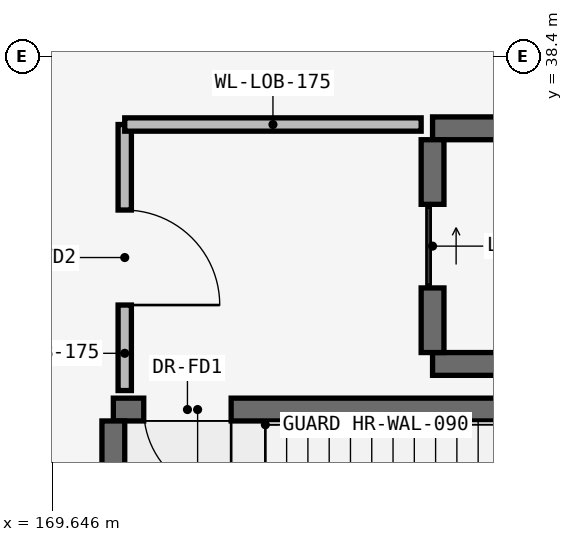
"""IFC4 building model, lengths in metres.
Left out: names, types, materials, properties, quantities, classifications, styles, units other than length and angle.
Written with IfcOpenShell. Run it as: python <this file> out.ifc"""

import sys

from ifc_helpers import new_model, si_unit, direction, frame, frame_2d, origin, place, context, subcontext, project, spatial, rectangle, extrude, element, fill, save


model = new_model("IFC4")
c1 = context("Model", 3, precision=1e-05, world=origin(), true_north=direction((0.0, 1.0)))
c2 = subcontext(c1, "Body", "Model", "MODEL_VIEW")
j1 = project(units=[si_unit("LENGTHUNIT", "METRE"), si_unit("PLANEANGLEUNIT", "RADIAN")], contexts=[c1])
p1 = place(None, origin())
s1 = spatial("IfcSite", under=j1, at=p1, CompositionType="ELEMENT")
p2 = place(p1, origin())
s2 = spatial("IfcBuilding", under=s1, at=p2, CompositionType="ELEMENT")
p3 = place(p2, frame((0.0, 0.0, -4.5)))
s3 = spatial("IfcBuildingStorey", under=s2, at=p3, CompositionType="ELEMENT", Elevation=-4.5)
p4 = place(p3, frame((170.45, 33.75, 0.0), z_axis=(0.0, 0.0, 1.0), x_axis=(1.0, 0.0, 0.0)))
e1 = element("IfcWall", 1, at=p4, inside=s3, PredefinedType="SHEAR", context=c2, shape_type="SweptSolid", body=[
    extrude(rectangle(XDim=7.92, YDim=0.3, at=frame_2d((3.96, 0.0))), origin(), (0.0, 0.0, 1.0), 4.15),
])
p5 = place(p4, frame((0.4, 0.0, 0.0)))
e2 = element("IfcOpeningElement", 2, at=p5, cuts=e1, PredefinedType="OPENING", context=c2, shape_type="SweptSolid", body=[
    extrude(rectangle(XDim=1.15, YDim=2.15, at=frame_2d((0.575, 1.075))), frame((0.0, 0.165, 0.0), z_axis=(0.0, -1.0, 0.0), x_axis=(1.0, 0.0, 0.0)), (0.0, 0.0, 1.0), 0.33),
])
p6 = place(p3, frame((170.45, 29.7, 0.0), z_axis=(0.0, 0.0, 1.0), x_axis=(0.0, 1.0, 0.0)))
e3 = element("IfcWall", 3, at=p6, inside=s3, PredefinedType="SHEAR", context=c2, shape_type="SweptSolid", body=[
    extrude(rectangle(XDim=3.9, YDim=0.3, at=frame_2d((1.95, 0.0))), origin(), (0.0, 0.0, 1.0), 4.15),
])
for number, where, z_axis, x_axis in (
    (4, (174.65, 34.35, 0.0), (0.0, 0.0, 1.0), (1.0, 0.0, 0.0)),
    (5, (174.65, 37.45, 0.0), (0.0, 0.0, 1.0), (1.0, 0.0, 0.0)),
):
    element("IfcWall", number, at=place(p3, frame(where, z_axis=z_axis, x_axis=x_axis)), inside=s3, PredefinedType="SHEAR", context=c2, shape_type="SweptSolid", body=[
        extrude(rectangle(XDim=3.1, YDim=0.3, at=frame_2d((1.55, 0.0))), origin(), (0.0, 0.0, 1.0), 4.15),
    ])
p7 = place(p3, frame((174.65, 34.5, 0.0), z_axis=(0.0, 0.0, 1.0), x_axis=(0.0, 1.0, 0.0)))
e6 = element("IfcWall", 6, at=p7, inside=s3, PredefinedType="SHEAR", context=c2, shape_type="SweptSolid", body=[
    extrude(rectangle(XDim=2.8, YDim=0.3, at=frame_2d((1.4, 0.0))), origin(), (0.0, 0.0, 1.0), 4.15),
])
p8 = place(p7, frame((0.85, 0.0, 0.0)))
e7 = element("IfcOpeningElement", 7, at=p8, cuts=e6, PredefinedType="OPENING", context=c2, shape_type="SweptSolid", body=[
    extrude(rectangle(XDim=1.1, YDim=2.15, at=frame_2d((0.55, 1.075))), frame((0.0, 0.165, 0.0), z_axis=(0.0, -1.0, 0.0), x_axis=(1.0, 0.0, 0.0)), (0.0, 0.0, 1.0), 0.33),
])
p9 = place(p3, frame((170.6, 34.0, 0.0), z_axis=(0.0, 0.0, 1.0), x_axis=(0.0, 1.0, 0.0)))
e8 = element("IfcWall", 8, at=p9, inside=s3, PredefinedType="PARTITIONING", context=c2, shape_type="SweptSolid", body=[
    extrude(rectangle(XDim=3.5, YDim=0.175, at=frame_2d((1.75, 0.0))), origin(), (0.0, 0.0, 1.0), 4.15),
])
p10 = place(p9, frame((1.125, 0.0, 0.0)))
e9 = element("IfcOpeningElement", 9, at=p10, cuts=e8, PredefinedType="OPENING", context=c2, shape_type="SweptSolid", body=[
    extrude(rectangle(XDim=1.25, YDim=2.2, at=frame_2d((0.625, 1.1))), frame((0.0, 0.103, 0.0), z_axis=(0.0, -1.0, 0.0), x_axis=(1.0, 0.0, 0.0)), (0.0, 0.0, 1.0), 0.205),
])
p11 = place(p3, frame((170.6, 37.5, 0.0), z_axis=(0.0, 0.0, 1.0), x_axis=(1.0, 0.0, 0.0)))
e10 = element("IfcWall", 10, at=p11, inside=s3, PredefinedType="PARTITIONING", context=c2, shape_type="SweptSolid", body=[
    extrude(rectangle(XDim=3.9, YDim=0.175, at=frame_2d((1.95, 0.0))), origin(), (0.0, 0.0, 1.0), 4.15),
])
p12 = place(p5, frame((1.15, 0.0, 0.0), z_axis=(0.0, 0.0, 1.0), x_axis=(-1.0, 0.0, 0.0)))
e11 = element("IfcDoor", 11, at=p12, inside=s3, OperationType="SINGLE_SWING_RIGHT", PredefinedType="DOOR", context=c2, shape_type="SweptSolid", body=[
    extrude(rectangle(XDim=1.15, YDim=2.15, at=frame_2d((0.575, 1.075))), frame((0.0, 0.025, 0.0), z_axis=(0.0, -1.0, 0.0), x_axis=(1.0, 0.0, 0.0)), (0.0, 0.0, 1.0), 0.05),
])
fill(e2, e11)
p13 = place(p8, origin())
e12 = element("IfcDoor", 12, at=p13, inside=s3, OperationType="SLIDING_TO_LEFT", PredefinedType="DOOR", context=c2, shape_type="SweptSolid", body=[
    extrude(rectangle(XDim=1.1, YDim=2.15, at=frame_2d((0.55, 1.075))), frame((0.0, 0.025, 0.0), z_axis=(0.0, -1.0, 0.0), x_axis=(1.0, 0.0, 0.0)), (0.0, 0.0, 1.0), 0.05),
])
fill(e7, e12)
p14 = place(p10, frame((1.25, 0.0, 0.0), z_axis=(0.0, 0.0, 1.0), x_axis=(-1.0, 0.0, 0.0)))
e13 = element("IfcDoor", 13, at=p14, inside=s3, OperationType="SINGLE_SWING_LEFT", PredefinedType="DOOR", context=c2, shape_type="SweptSolid", body=[
    extrude(rectangle(XDim=1.25, YDim=2.2, at=frame_2d((0.625, 1.1))), frame((0.0, 0.025, 0.0), z_axis=(0.0, -1.0, 0.0), x_axis=(1.0, 0.0, 0.0)), (0.0, 0.0, 1.0), 0.05),
])
fill(e9, e13)
save(model, sys.argv[1])
